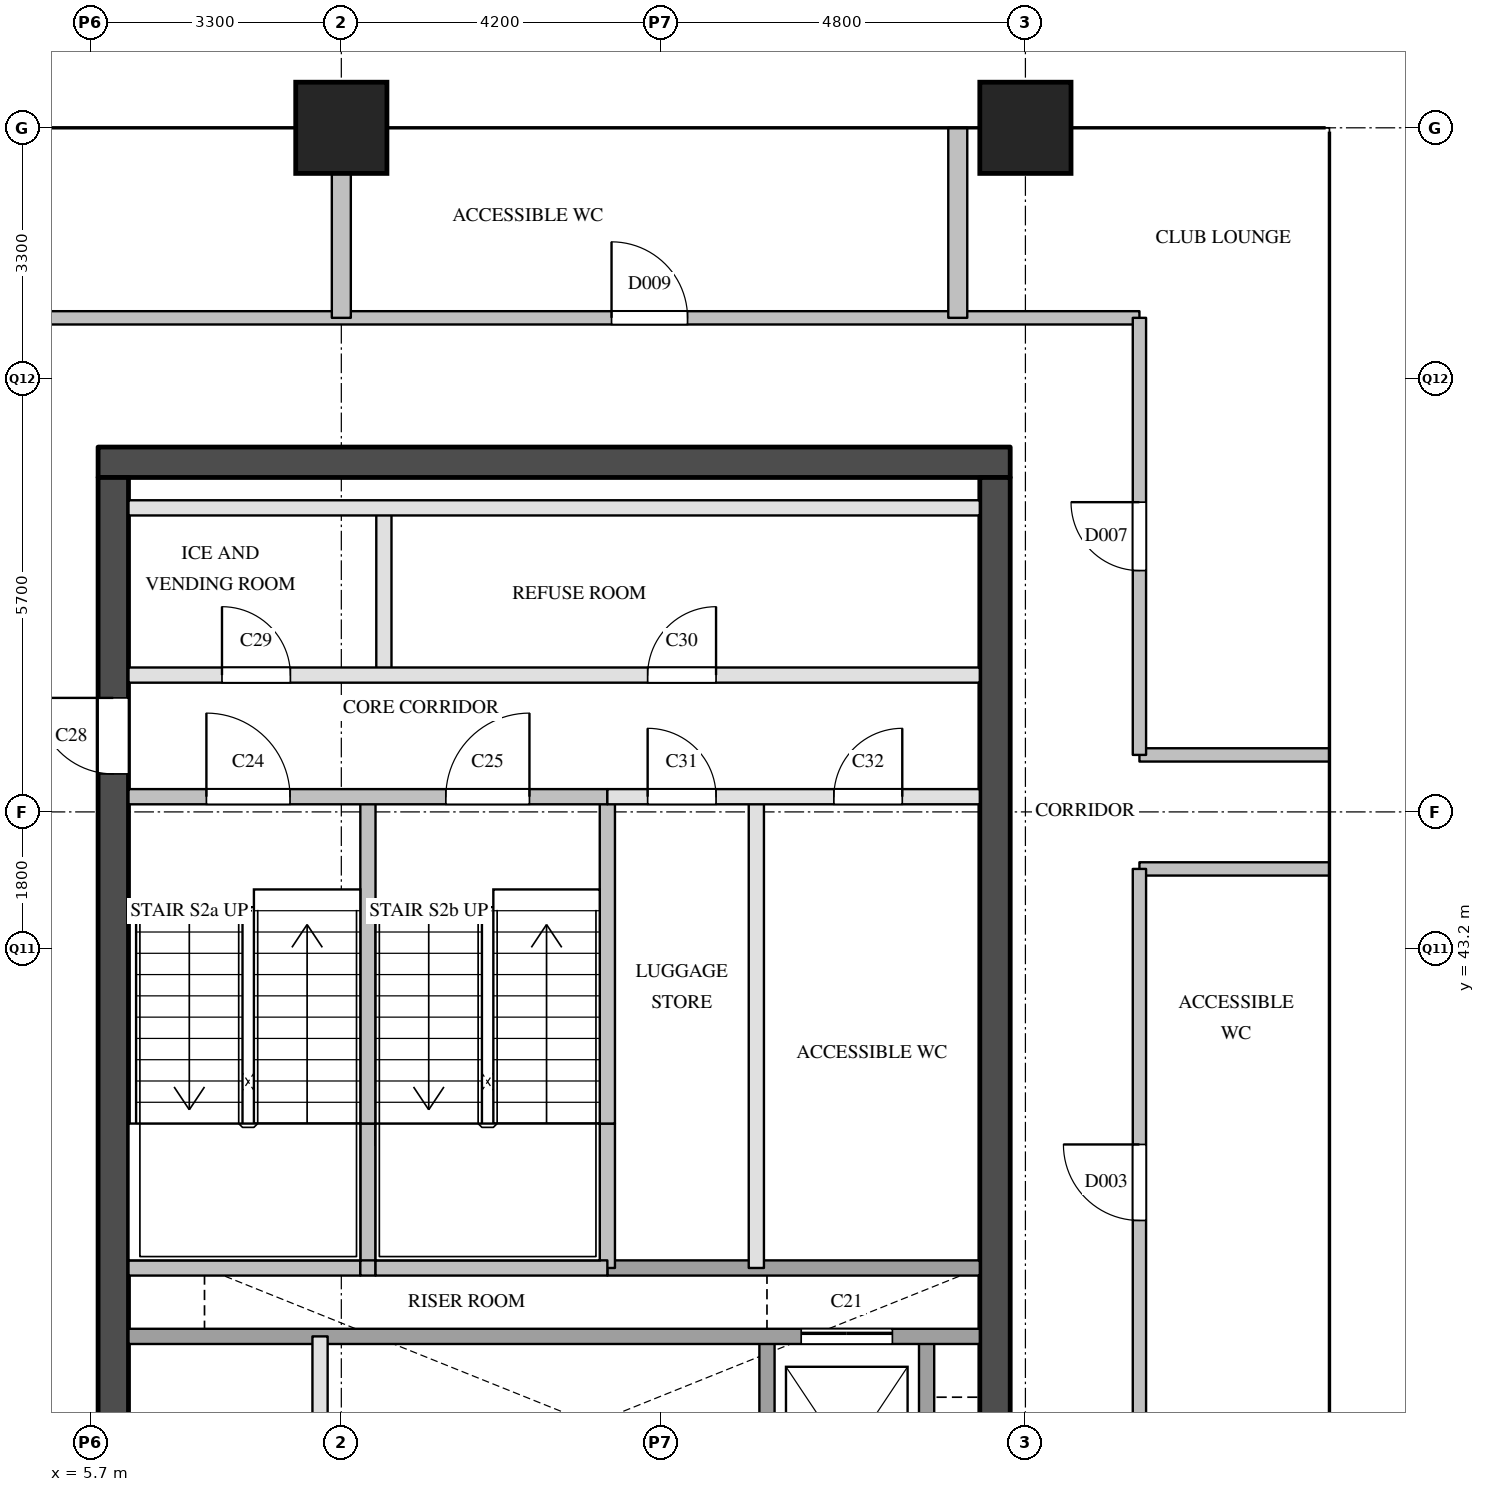
"""IFC4 building model, lengths in metres.
Left out: names, types, materials, properties, quantities, classifications, styles, units other than length and angle.
Written with IfcOpenShell. Run it as: python <this file> out.ifc"""

import sys

from ifc_helpers import new_model, si_unit, direction, frame, frame_2d, origin, origin_2d, place, context, subcontext, project, spatial, rectangle, extrude, element, fill, save


model = new_model("IFC4")
c1 = context("Model", 3, precision=1e-05, world=origin(), true_north=direction((0.0, 1.0)))
c2 = subcontext(c1, "Body", "Model", "MODEL_VIEW")
j1 = project(units=[si_unit("LENGTHUNIT", "METRE"), si_unit("PLANEANGLEUNIT", "RADIAN")], contexts=[c1])
p1 = place(None, origin())
s1 = spatial("IfcSite", under=j1, at=p1, CompositionType="ELEMENT")
p2 = place(p1, origin())
s2 = spatial("IfcBuilding", under=s1, at=p2, CompositionType="ELEMENT")
p3 = place(p2, frame((0.0, 0.0, 215.0)))
s3 = spatial("IfcBuildingStorey", under=s2, at=p3, CompositionType="ELEMENT", Elevation=215.0)
for number, where, z_axis, x_axis in (
    (1, (9.0, 54.0, 0.0), (0.0, 0.0, 1.0), (1.0, 0.0, 0.0)),
    (2, (18.0, 54.0, 0.0), (0.0, 0.0, 1.0), (1.0, 0.0, 0.0)),
):
    element("IfcColumn", number, at=place(p3, frame(where, z_axis=z_axis, x_axis=x_axis)), inside=s3, PredefinedType="COLUMN", context=c2, shape_type="SweptSolid", body=[
        extrude(rectangle(XDim=1.2, YDim=1.2, at=origin_2d()), origin(), (0.0, 0.0, 1.0), 3.9),
    ])
p4 = place(p3, frame((5.8, 49.6, 0.0), z_axis=(0.0, 0.0, 1.0), x_axis=(1.0, 0.0, 0.0)))
e3 = element("IfcWall", 3, at=p4, inside=s3, PredefinedType="SHEAR", context=c2, shape_type="SweptSolid", body=[
    extrude(rectangle(XDim=12.0, YDim=0.4, at=frame_2d((6.0, 0.0))), origin(), (0.0, 0.0, 1.0), 3.6),
])
p5 = place(p3, frame((6.0, 29.1, 0.0), z_axis=(0.0, 0.0, 1.0), x_axis=(0.0, 1.0, 0.0)))
e4 = element("IfcWall", 4, at=p5, inside=s3, PredefinedType="SHEAR", context=c2, shape_type="SweptSolid", body=[
    extrude(rectangle(XDim=20.3, YDim=0.4, at=frame_2d((10.15, 0.0))), origin(), (0.0, 0.0, 1.0), 3.6),
])
p6 = place(p5, frame((3.45, 0.0, 0.0)))
e5 = element("IfcOpeningElement", 5, at=p6, cuts=e4, PredefinedType="OPENING", context=c2, shape_type="SweptSolid", body=[
    extrude(rectangle(XDim=1.0, YDim=2.1, at=frame_2d((0.5, 1.05))), frame((0.0, 0.21, 0.0), z_axis=(0.0, -1.0, 0.0), x_axis=(1.0, 0.0, 0.0)), (0.0, 0.0, 1.0), 0.42),
])
p7 = place(p5, frame((16.4, 0.0, 0.0)))
e6 = element("IfcOpeningElement", 6, at=p7, cuts=e4, PredefinedType="OPENING", context=c2, shape_type="SweptSolid", body=[
    extrude(rectangle(XDim=1.0, YDim=2.1, at=frame_2d((0.5, 1.05))), frame((0.0, 0.21, 0.0), z_axis=(0.0, -1.0, 0.0), x_axis=(1.0, 0.0, 0.0)), (0.0, 0.0, 1.0), 0.42),
])
p8 = place(p3, frame((17.6, 29.1, 0.0), z_axis=(0.0, 0.0, 1.0), x_axis=(0.0, 1.0, 0.0)))
e7 = element("IfcWall", 7, at=p8, inside=s3, PredefinedType="SHEAR", context=c2, shape_type="SweptSolid", body=[
    extrude(rectangle(XDim=20.3, YDim=0.4, at=frame_2d((10.15, 0.0))), origin(), (0.0, 0.0, 1.0), 3.6),
])
p9 = place(p8, frame((1.25, 0.0, 0.0)))
e8 = element("IfcOpeningElement", 8, at=p9, cuts=e7, PredefinedType="OPENING", context=c2, shape_type="SweptSolid", body=[
    extrude(rectangle(XDim=0.7, YDim=2.1, at=frame_2d((0.35, 1.05))), frame((0.0, 0.21, 0.0), z_axis=(0.0, -1.0, 0.0), x_axis=(1.0, 0.0, 0.0)), (0.0, 0.0, 1.0), 0.42),
])
p10 = place(p8, frame((7.05, 0.0, 0.0)))
e9 = element("IfcOpeningElement", 9, at=p10, cuts=e7, PredefinedType="OPENING", context=c2, shape_type="SweptSolid", body=[
    extrude(rectangle(XDim=0.7, YDim=2.1, at=frame_2d((0.35, 1.05))), frame((0.0, 0.21, 0.0), z_axis=(0.0, -1.0, 0.0), x_axis=(1.0, 0.0, 0.0)), (0.0, 0.0, 1.0), 0.42),
])
p11 = place(p8, frame((3.6, 0.0, 0.0)))
e10 = element("IfcOpeningElement", 10, at=p11, cuts=e7, PredefinedType="OPENING", context=c2, shape_type="SweptSolid", body=[
    extrude(rectangle(XDim=1.8, YDim=2.1, at=frame_2d((0.9, 1.05))), frame((0.0, 0.21, 0.0), z_axis=(0.0, -1.0, 0.0), x_axis=(1.0, 0.0, 0.0)), (0.0, 0.0, 1.0), 0.42),
])
p12 = place(p3, frame((8.72, 33.8, 0.0), z_axis=(0.0, 0.0, 1.0), x_axis=(0.0, 1.0, 0.0)))
e11 = element("IfcWall", 11, at=p12, inside=s3, PredefinedType="PARTITIONING", context=c2, shape_type="SweptSolid", body=[
    extrude(rectangle(XDim=4.3, YDim=0.2, at=frame_2d((2.15, 0.0))), origin(), (0.0, 0.0, 1.0), 3.6),
])
p13 = place(p3, frame((9.35, 39.0, 0.0), z_axis=(0.0, 0.0, 1.0), x_axis=(0.0, 1.0, 0.0)))
e12 = element("IfcWall", 12, at=p13, inside=s3, PredefinedType="SOLIDWALL", context=c2, shape_type="SweptSolid", body=[
    extrude(rectangle(XDim=1.9, YDim=0.2, at=frame_2d((0.95, 0.0))), origin(), (0.0, 0.0, 1.0), 3.6),
])
p14 = place(p3, frame((9.35, 40.9, 0.0), z_axis=(0.0, 0.0, 1.0), x_axis=(0.0, 1.0, 0.0)))
e13 = element("IfcWall", 13, at=p14, inside=s3, PredefinedType="SOLIDWALL", context=c2, shape_type="SweptSolid", body=[
    extrude(rectangle(XDim=4.3, YDim=0.2, at=frame_2d((2.15, 0.0))), origin(), (0.0, 0.0, 1.0), 3.6),
])
p15 = place(p3, frame((9.56, 46.8, 0.0), z_axis=(0.0, 0.0, 1.0), x_axis=(0.0, 1.0, 0.0)))
e14 = element("IfcWall", 14, at=p15, inside=s3, PredefinedType="PARTITIONING", context=c2, shape_type="SweptSolid", body=[
    extrude(rectangle(XDim=2.2, YDim=0.2, at=frame_2d((1.1, 0.0))), origin(), (0.0, 0.0, 1.0), 3.6),
])
p16 = place(p3, frame((12.5, 39.0, 0.0), z_axis=(0.0, 0.0, 1.0), x_axis=(0.0, 1.0, 0.0)))
e15 = element("IfcWall", 15, at=p16, inside=s3, PredefinedType="SOLIDWALL", context=c2, shape_type="SweptSolid", body=[
    extrude(rectangle(XDim=1.9, YDim=0.2, at=frame_2d((0.95, 0.0))), origin(), (0.0, 0.0, 1.0), 3.6),
])
p17 = place(p3, frame((12.5, 40.9, 0.0), z_axis=(0.0, 0.0, 1.0), x_axis=(0.0, 1.0, 0.0)))
e16 = element("IfcWall", 16, at=p17, inside=s3, PredefinedType="SOLIDWALL", context=c2, shape_type="SweptSolid", body=[
    extrude(rectangle(XDim=4.3, YDim=0.2, at=frame_2d((2.15, 0.0))), origin(), (0.0, 0.0, 1.0), 3.6),
])
p18 = place(p3, frame((14.46, 39.0, 0.0), z_axis=(0.0, 0.0, 1.0), x_axis=(0.0, 1.0, 0.0)))
e17 = element("IfcWall", 17, at=p18, inside=s3, PredefinedType="PARTITIONING", context=c2, shape_type="SweptSolid", body=[
    extrude(rectangle(XDim=6.2, YDim=0.2, at=frame_2d((3.1, 0.0))), origin(), (0.0, 0.0, 1.0), 3.6),
])
for number, where, z_axis, x_axis in (
    (18, (14.6, 34.9, 0.0), (0.0, 0.0, 1.0), (0.0, 1.0, 0.0)),
    (19, (16.7, 34.9, 0.0), (0.0, 0.0, 1.0), (0.0, 1.0, 0.0)),
):
    element("IfcWall", number, at=place(p3, frame(where, z_axis=z_axis, x_axis=x_axis)), inside=s3, PredefinedType="SOLIDWALL", context=c2, shape_type="SweptSolid", body=[
        extrude(rectangle(XDim=3.2, YDim=0.2, at=frame_2d((1.6, 0.0))), origin(), (0.0, 0.0, 1.0), 3.6),
    ])
p19 = place(p3, frame((6.2, 38.1, 0.0), z_axis=(0.0, 0.0, 1.0), x_axis=(1.0, 0.0, 0.0)))
e20 = element("IfcWall", 20, at=p19, inside=s3, PredefinedType="SOLIDWALL", context=c2, shape_type="SweptSolid", body=[
    extrude(rectangle(XDim=11.2, YDim=0.2, at=frame_2d((5.6, 0.0))), origin(), (0.0, 0.0, 1.0), 3.6),
])
p20 = place(p19, frame((8.85, 0.0, 0.0)))
e21 = element("IfcOpeningElement", 21, at=p20, cuts=e20, PredefinedType="OPENING", context=c2, shape_type="SweptSolid", body=[
    extrude(rectangle(XDim=1.2, YDim=2.1, at=frame_2d((0.6, 1.05))), frame((0.0, 0.11, 0.0), z_axis=(0.0, -1.0, 0.0), x_axis=(1.0, 0.0, 0.0)), (0.0, 0.0, 1.0), 0.22),
])
p21 = place(p3, frame((12.5, 39.0, 0.0), z_axis=(0.0, 0.0, 1.0), x_axis=(1.0, 0.0, 0.0)))
e22 = element("IfcWall", 22, at=p21, inside=s3, PredefinedType="SOLIDWALL", context=c2, shape_type="SweptSolid", body=[
    extrude(rectangle(XDim=4.9, YDim=0.2, at=frame_2d((2.45, 0.0))), origin(), (0.0, 0.0, 1.0), 3.6),
])
p22 = place(p3, frame((6.2, 39.0, 0.0), z_axis=(0.0, 0.0, 1.0), x_axis=(1.0, 0.0, 0.0)))
e23 = element("IfcWall", 23, at=p22, inside=s3, PredefinedType="SOLIDWALL", context=c2, shape_type="SweptSolid", body=[
    extrude(rectangle(XDim=3.05, YDim=0.2, at=frame_2d((1.525, 0.0))), origin(), (0.0, 0.0, 1.0), 3.6),
])
p23 = place(p3, frame((9.25, 39.0, 0.0), z_axis=(0.0, 0.0, 1.0), x_axis=(1.0, 0.0, 0.0)))
e24 = element("IfcWall", 24, at=p23, inside=s3, PredefinedType="SOLIDWALL", context=c2, shape_type="SweptSolid", body=[
    extrude(rectangle(XDim=0.2, YDim=0.2, at=frame_2d((0.1, 0.0))), origin(), (0.0, 0.0, 1.0), 3.6),
])
p24 = place(p3, frame((9.45, 39.0, 0.0), z_axis=(0.0, 0.0, 1.0), x_axis=(1.0, 0.0, 0.0)))
e25 = element("IfcWall", 25, at=p24, inside=s3, PredefinedType="SOLIDWALL", context=c2, shape_type="SweptSolid", body=[
    extrude(rectangle(XDim=3.05, YDim=0.2, at=frame_2d((1.525, 0.0))), origin(), (0.0, 0.0, 1.0), 3.6),
])
p25 = place(p3, frame((12.5, 45.2, 0.0), z_axis=(0.0, 0.0, 1.0), x_axis=(1.0, 0.0, 0.0)))
e26 = element("IfcWall", 26, at=p25, inside=s3, PredefinedType="PARTITIONING", context=c2, shape_type="SweptSolid", body=[
    extrude(rectangle(XDim=4.9, YDim=0.2, at=frame_2d((2.45, 0.0))), origin(), (0.0, 0.0, 1.0), 3.6),
])
p26 = place(p25, frame((0.53, 0.0, 0.0)))
e27 = element("IfcOpeningElement", 27, at=p26, cuts=e26, PredefinedType="OPENING", context=c2, shape_type="SweptSolid", body=[
    extrude(rectangle(XDim=0.9, YDim=2.1, at=frame_2d((0.45, 1.05))), frame((0.0, 0.11, 0.0), z_axis=(0.0, -1.0, 0.0), x_axis=(1.0, 0.0, 0.0)), (0.0, 0.0, 1.0), 0.22),
])
p27 = place(p25, frame((2.98, 0.0, 0.0)))
e28 = element("IfcOpeningElement", 28, at=p27, cuts=e26, PredefinedType="OPENING", context=c2, shape_type="SweptSolid", body=[
    extrude(rectangle(XDim=0.9, YDim=2.1, at=frame_2d((0.45, 1.05))), frame((0.0, 0.11, 0.0), z_axis=(0.0, -1.0, 0.0), x_axis=(1.0, 0.0, 0.0)), (0.0, 0.0, 1.0), 0.22),
])
p28 = place(p3, frame((6.2, 45.2, 0.0), z_axis=(0.0, 0.0, 1.0), x_axis=(1.0, 0.0, 0.0)))
e29 = element("IfcWall", 29, at=p28, inside=s3, PredefinedType="SOLIDWALL", context=c2, shape_type="SweptSolid", body=[
    extrude(rectangle(XDim=6.3, YDim=0.2, at=frame_2d((3.15, 0.0))), origin(), (0.0, 0.0, 1.0), 3.6),
])
p29 = place(p28, frame((1.025, 0.0, 0.0)))
e30 = element("IfcOpeningElement", 30, at=p29, cuts=e29, PredefinedType="OPENING", context=c2, shape_type="SweptSolid", body=[
    extrude(rectangle(XDim=1.1, YDim=2.1, at=frame_2d((0.55, 1.05))), frame((0.0, 0.11, 0.0), z_axis=(0.0, -1.0, 0.0), x_axis=(1.0, 0.0, 0.0)), (0.0, 0.0, 1.0), 0.22),
])
p30 = place(p28, frame((4.175, 0.0, 0.0)))
e31 = element("IfcOpeningElement", 31, at=p30, cuts=e29, PredefinedType="OPENING", context=c2, shape_type="SweptSolid", body=[
    extrude(rectangle(XDim=1.1, YDim=2.1, at=frame_2d((0.55, 1.05))), frame((0.0, 0.11, 0.0), z_axis=(0.0, -1.0, 0.0), x_axis=(1.0, 0.0, 0.0)), (0.0, 0.0, 1.0), 0.22),
])
p31 = place(p3, frame((6.2, 46.8, 0.0), z_axis=(0.0, 0.0, 1.0), x_axis=(1.0, 0.0, 0.0)))
e32 = element("IfcWall", 32, at=p31, inside=s3, PredefinedType="PARTITIONING", context=c2, shape_type="SweptSolid", body=[
    extrude(rectangle(XDim=11.2, YDim=0.2, at=frame_2d((5.6, 0.0))), origin(), (0.0, 0.0, 1.0), 3.6),
])
p32 = place(p31, frame((1.23, 0.0, 0.0)))
e33 = element("IfcOpeningElement", 33, at=p32, cuts=e32, PredefinedType="OPENING", context=c2, shape_type="SweptSolid", body=[
    extrude(rectangle(XDim=0.9, YDim=2.1, at=frame_2d((0.45, 1.05))), frame((0.0, 0.11, 0.0), z_axis=(0.0, -1.0, 0.0), x_axis=(1.0, 0.0, 0.0)), (0.0, 0.0, 1.0), 0.22),
])
p33 = place(p31, frame((6.83, 0.0, 0.0)))
e34 = element("IfcOpeningElement", 34, at=p33, cuts=e32, PredefinedType="OPENING", context=c2, shape_type="SweptSolid", body=[
    extrude(rectangle(XDim=0.9, YDim=2.1, at=frame_2d((0.45, 1.05))), frame((0.0, 0.11, 0.0), z_axis=(0.0, -1.0, 0.0), x_axis=(1.0, 0.0, 0.0)), (0.0, 0.0, 1.0), 0.22),
])
p34 = place(p3, frame((6.2, 49.0, 0.0), z_axis=(0.0, 0.0, 1.0), x_axis=(1.0, 0.0, 0.0)))
e35 = element("IfcWall", 35, at=p34, inside=s3, PredefinedType="PARTITIONING", context=c2, shape_type="SweptSolid", body=[
    extrude(rectangle(XDim=11.2, YDim=0.2, at=frame_2d((5.6, 0.0))), origin(), (0.0, 0.0, 1.0), 3.6),
])
for number, where, z_axis, x_axis in (
    (36, (19.5, 44.25, 0.0), (0.0, 0.0, 1.0), (1.0, 0.0, 0.0)),
    (37, (19.5, 45.75, 0.0), (0.0, 0.0, 1.0), (1.0, 0.0, 0.0)),
):
    element("IfcWall", number, at=place(p3, frame(where, z_axis=z_axis, x_axis=x_axis)), inside=s3, PredefinedType="PARTITIONING", context=c2, shape_type="SweptSolid", body=[
        extrude(rectangle(XDim=2.5, YDim=0.175, at=frame_2d((1.25, 0.0))), origin(), (0.0, 0.0, 1.0), 3.6),
    ])
p35 = place(p3, frame((4.1, 51.5, 0.0), z_axis=(0.0, 0.0, 1.0), x_axis=(1.0, 0.0, 0.0)))
e38 = element("IfcWall", 38, at=p35, inside=s3, PredefinedType="PARTITIONING", context=c2, shape_type="SweptSolid", body=[
    extrude(rectangle(XDim=15.4, YDim=0.175, at=frame_2d((7.7, 0.0))), origin(), (0.0, 0.0, 1.0), 3.6),
])
p36 = place(p35, frame((8.455, 0.0, 0.0)))
e39 = element("IfcOpeningElement", 39, at=p36, cuts=e38, PredefinedType="OPENING", context=c2, shape_type="SweptSolid", body=[
    extrude(rectangle(XDim=1.0, YDim=2.1, at=frame_2d((0.5, 1.05))), frame((0.0, 0.097, 0.0), z_axis=(0.0, -1.0, 0.0), x_axis=(1.0, 0.0, 0.0)), (0.0, 0.0, 1.0), 0.195),
])
p37 = place(p3, frame((19.5, 28.5, 0.0), z_axis=(0.0, 0.0, 1.0), x_axis=(0.0, 1.0, 0.0)))
e40 = element("IfcWall", 40, at=p37, inside=s3, PredefinedType="PARTITIONING", context=c2, shape_type="SweptSolid", body=[
    extrude(rectangle(XDim=15.75, YDim=0.175, at=frame_2d((7.875, 0.0))), origin(), (0.0, 0.0, 1.0), 3.6),
])
p38 = place(p37, frame((11.125, 0.0, 0.0)))
e41 = element("IfcOpeningElement", 41, at=p38, cuts=e40, PredefinedType="OPENING", context=c2, shape_type="SweptSolid", body=[
    extrude(rectangle(XDim=1.0, YDim=2.1, at=frame_2d((0.5, 1.05))), frame((0.0, 0.097, 0.0), z_axis=(0.0, -1.0, 0.0), x_axis=(1.0, 0.0, 0.0)), (0.0, 0.0, 1.0), 0.195),
])
p39 = place(p3, frame((19.5, 45.75, 0.0), z_axis=(0.0, 0.0, 1.0), x_axis=(0.0, 1.0, 0.0)))
e42 = element("IfcWall", 42, at=p39, inside=s3, PredefinedType="PARTITIONING", context=c2, shape_type="SweptSolid", body=[
    extrude(rectangle(XDim=5.75, YDim=0.175, at=frame_2d((2.875, 0.0))), origin(), (0.0, 0.0, 1.0), 3.6),
])
p40 = place(p39, frame((2.425, 0.0, 0.0)))
e43 = element("IfcOpeningElement", 43, at=p40, cuts=e42, PredefinedType="OPENING", context=c2, shape_type="SweptSolid", body=[
    extrude(rectangle(XDim=0.9, YDim=2.1, at=frame_2d((0.45, 1.05))), frame((0.0, 0.097, 0.0), z_axis=(0.0, -1.0, 0.0), x_axis=(1.0, 0.0, 0.0)), (0.0, 0.0, 1.0), 0.195),
])
p41 = place(p3, frame((9.0, 51.5, 0.0), z_axis=(0.0, 0.0, 1.0), x_axis=(0.0, 1.0, 0.0)))
e44 = element("IfcWall", 44, at=p41, inside=s3, PredefinedType="PARTITIONING", context=c2, shape_type="SweptSolid", body=[
    extrude(rectangle(XDim=2.5, YDim=0.25, at=frame_2d((1.25, 0.0))), origin(), (0.0, 0.0, 1.0), 3.6),
])
p42 = place(p3, frame((17.11, 51.5, 0.0), z_axis=(0.0, 0.0, 1.0), x_axis=(0.0, 1.0, 0.0)))
e45 = element("IfcWall", 45, at=p42, inside=s3, PredefinedType="PARTITIONING", context=c2, shape_type="SweptSolid", body=[
    extrude(rectangle(XDim=2.5, YDim=0.25, at=frame_2d((1.25, 0.0))), origin(), (0.0, 0.0, 1.0), 2.6),
])
p43 = place(p20, origin())
e46 = element("IfcDoor", 46, at=p43, inside=s3, OperationType="SLIDING_TO_LEFT", PredefinedType="DOOR", context=c2, shape_type="SweptSolid", body=[
    extrude(rectangle(XDim=1.2, YDim=2.1, at=frame_2d((0.6, 1.05))), frame((0.0, 0.025, 0.0), z_axis=(0.0, -1.0, 0.0), x_axis=(1.0, 0.0, 0.0)), (0.0, 0.0, 1.0), 0.05),
])
fill(e21, e46)
p44 = place(p29, origin())
e47 = element("IfcDoor", 47, at=p44, inside=s3, OperationType="SINGLE_SWING_LEFT", PredefinedType="DOOR", context=c2, shape_type="SweptSolid", body=[
    extrude(rectangle(XDim=1.1, YDim=2.1, at=frame_2d((0.55, 1.05))), frame((0.0, 0.025, 0.0), z_axis=(0.0, -1.0, 0.0), x_axis=(1.0, 0.0, 0.0)), (0.0, 0.0, 1.0), 0.05),
])
fill(e30, e47)
p45 = place(p30, origin())
e48 = element("IfcDoor", 48, at=p45, inside=s3, OperationType="SINGLE_SWING_RIGHT", PredefinedType="DOOR", context=c2, shape_type="SweptSolid", body=[
    extrude(rectangle(XDim=1.1, YDim=2.1, at=frame_2d((0.55, 1.05))), frame((0.0, 0.025, 0.0), z_axis=(0.0, -1.0, 0.0), x_axis=(1.0, 0.0, 0.0)), (0.0, 0.0, 1.0), 0.05),
])
fill(e31, e48)
p46 = place(p7, origin())
e49 = element("IfcDoor", 49, at=p46, inside=s3, OperationType="SINGLE_SWING_RIGHT", PredefinedType="DOOR", context=c2, shape_type="SweptSolid", body=[
    extrude(rectangle(XDim=1.0, YDim=2.1, at=frame_2d((0.5, 1.05))), frame((0.0, 0.025, 0.0), z_axis=(0.0, -1.0, 0.0), x_axis=(1.0, 0.0, 0.0)), (0.0, 0.0, 1.0), 0.05),
])
fill(e6, e49)
p47 = place(p32, origin())
e50 = element("IfcDoor", 50, at=p47, inside=s3, OperationType="SINGLE_SWING_LEFT", PredefinedType="DOOR", context=c2, shape_type="SweptSolid", body=[
    extrude(rectangle(XDim=0.9, YDim=2.1, at=frame_2d((0.45, 1.05))), frame((0.0, 0.025, 0.0), z_axis=(0.0, -1.0, 0.0), x_axis=(1.0, 0.0, 0.0)), (0.0, 0.0, 1.0), 0.05),
])
fill(e33, e50)
p48 = place(p33, origin())
e51 = element("IfcDoor", 51, at=p48, inside=s3, OperationType="SINGLE_SWING_RIGHT", PredefinedType="DOOR", context=c2, shape_type="SweptSolid", body=[
    extrude(rectangle(XDim=0.9, YDim=2.1, at=frame_2d((0.45, 1.05))), frame((0.0, 0.025, 0.0), z_axis=(0.0, -1.0, 0.0), x_axis=(1.0, 0.0, 0.0)), (0.0, 0.0, 1.0), 0.05),
])
fill(e34, e51)
p49 = place(p26, origin())
e52 = element("IfcDoor", 52, at=p49, inside=s3, OperationType="SINGLE_SWING_LEFT", PredefinedType="DOOR", context=c2, shape_type="SweptSolid", body=[
    extrude(rectangle(XDim=0.9, YDim=2.1, at=frame_2d((0.45, 1.05))), frame((0.0, 0.025, 0.0), z_axis=(0.0, -1.0, 0.0), x_axis=(1.0, 0.0, 0.0)), (0.0, 0.0, 1.0), 0.05),
])
fill(e27, e52)
p50 = place(p27, origin())
e53 = element("IfcDoor", 53, at=p50, inside=s3, OperationType="SINGLE_SWING_RIGHT", PredefinedType="DOOR", context=c2, shape_type="SweptSolid", body=[
    extrude(rectangle(XDim=0.9, YDim=2.1, at=frame_2d((0.45, 1.05))), frame((0.0, 0.025, 0.0), z_axis=(0.0, -1.0, 0.0), x_axis=(1.0, 0.0, 0.0)), (0.0, 0.0, 1.0), 0.05),
])
fill(e28, e53)
p51 = place(p38, origin())
e54 = element("IfcDoor", 54, at=p51, inside=s3, OperationType="SINGLE_SWING_RIGHT", PredefinedType="DOOR", context=c2, shape_type="SweptSolid", body=[
    extrude(rectangle(XDim=1.0, YDim=2.1, at=frame_2d((0.5, 1.05))), frame((0.0, 0.025, 0.0), z_axis=(0.0, -1.0, 0.0), x_axis=(1.0, 0.0, 0.0)), (0.0, 0.0, 1.0), 0.05),
])
fill(e41, e54)
p52 = place(p40, origin())
e55 = element("IfcDoor", 55, at=p52, inside=s3, OperationType="SINGLE_SWING_RIGHT", PredefinedType="DOOR", context=c2, shape_type="SweptSolid", body=[
    extrude(rectangle(XDim=0.9, YDim=2.1, at=frame_2d((0.45, 1.05))), frame((0.0, 0.025, 0.0), z_axis=(0.0, -1.0, 0.0), x_axis=(1.0, 0.0, 0.0)), (0.0, 0.0, 1.0), 0.05),
])
fill(e43, e55)
p53 = place(p36, origin())
e56 = element("IfcDoor", 56, at=p53, inside=s3, OperationType="SINGLE_SWING_LEFT", PredefinedType="DOOR", context=c2, shape_type="SweptSolid", body=[
    extrude(rectangle(XDim=1.0, YDim=2.1, at=frame_2d((0.5, 1.05))), frame((0.0, 0.025, 0.0), z_axis=(0.0, -1.0, 0.0), x_axis=(1.0, 0.0, 0.0)), (0.0, 0.0, 1.0), 0.05),
])
fill(e39, e56)
save(model, sys.argv[1])
